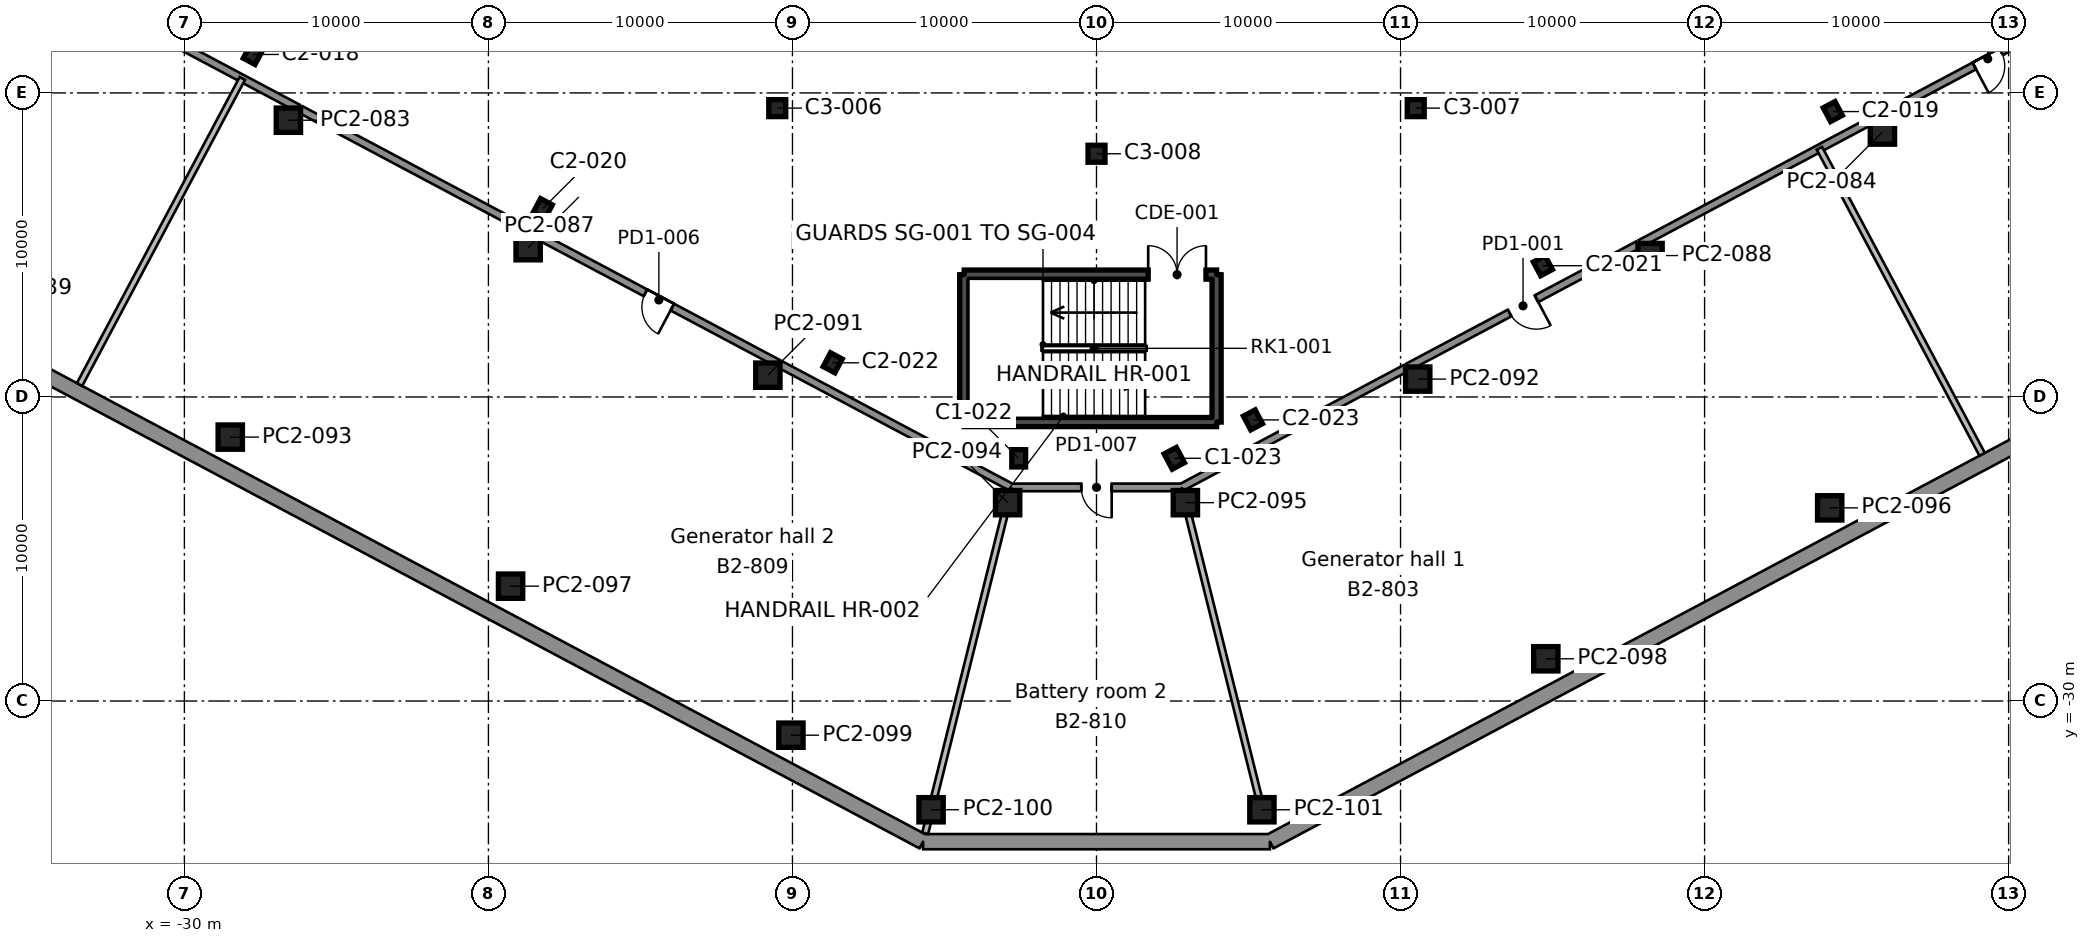
"""IFC4 building model, lengths in metres.
Left out: names, types, materials, properties, quantities, classifications, styles, units other than length and angle.
Written with IfcOpenShell. Run it as: python <this file> out.ifc"""

import sys

from ifc_helpers import new_model, si_unit, direction, frame, frame_2d, origin, origin_2d, place, context, subcontext, project, spatial, rectangle, hollow_rectangle, i_section, extrude, element, fill, save


model = new_model("IFC4")
c1 = context("Model", 3, precision=1e-05, world=origin(), true_north=direction((0.0, 1.0)))
c2 = subcontext(c1, "Body", "Model", "MODEL_VIEW")
j1 = project(units=[si_unit("LENGTHUNIT", "METRE"), si_unit("PLANEANGLEUNIT", "RADIAN")], contexts=[c1])
p1 = place(None, origin())
s1 = spatial("IfcSite", under=j1, at=p1, CompositionType="ELEMENT")
p2 = place(p1, origin())
s2 = spatial("IfcBuilding", under=s1, at=p2, CompositionType="ELEMENT")
p3 = place(p2, frame((0.0, 0.0, -9.0)))
s3 = spatial("IfcBuildingStorey", under=s2, at=p3, CompositionType="ELEMENT", Elevation=-9.0)
for number, where, z_axis, x_axis in (
    (1, (-2.559, -22.017, 0.0), (0.0, 0.0, 1.0), (1.0, 0.0, 0.0)),
    (2, (2.559, -22.017, 0.0), (0.0, 0.0, 1.0), (0.883, 0.469, 0.0)),
):
    element("IfcColumn", number, at=place(p3, frame(where, z_axis=z_axis, x_axis=x_axis)), inside=s3, PredefinedType="COLUMN", context=c2, shape_type="SweptSolid", body=[
        extrude(i_section(OverallWidth=0.455, OverallDepth=0.569, WebThickness=0.078, FlangeThickness=0.125, FilletRadius=0.015, at=origin_2d()), origin(), (0.0, 0.0, 1.0), 4.5),
    ])
for number, where, z_axis, x_axis in (
    (3, (5.146, -20.754, 0.0), (0.0, 0.0, 1.0), (0.883, 0.469, 0.0)),
    (4, (-8.677, -18.876, 0.0), (0.0, 0.0, 1.0), (0.883, -0.469, 0.0)),
    (5, (14.681, -15.683, 0.0), (0.0, 0.0, 1.0), (0.883, 0.469, 0.0)),
    (6, (-18.213, -13.805, 0.0), (0.0, 0.0, 1.0), (0.883, -0.469, 0.0)),
):
    element("IfcColumn", number, at=place(p3, frame(where, z_axis=z_axis, x_axis=x_axis)), inside=s3, PredefinedType="COLUMN", context=c2, shape_type="SweptSolid", body=[
        extrude(i_section(OverallWidth=0.437, OverallDepth=0.513, WebThickness=0.061, FlangeThickness=0.097, FilletRadius=0.015, at=origin_2d()), origin(), (0.0, 0.0, 1.0), 4.5),
    ])
p4 = place(p3, frame((0.0, -12.0, 0.0), z_axis=(0.0, 0.0, 1.0), x_axis=(1.0, 0.0, 0.0)))
e7 = element("IfcColumn", 7, at=p4, inside=s3, PredefinedType="COLUMN", context=c2, shape_type="SweptSolid", body=[
    extrude(hollow_rectangle(XDim=0.559, YDim=0.559, WallThickness=0.024, InnerFilletRadius=0.012, OuterFilletRadius=0.035, at=origin_2d()), origin(), (0.0, 0.0, 1.0), 4.5),
])
p5 = place(p3, frame((24.217, -10.613, 0.0), z_axis=(0.0, 0.0, 1.0), x_axis=(0.882947592859, 0.469471562786, 0.0)))
e8 = element("IfcColumn", 8, at=p5, inside=s3, PredefinedType="COLUMN", context=c2, shape_type="SweptSolid", body=[
    extrude(i_section(OverallWidth=0.437, OverallDepth=0.513, WebThickness=0.061, FlangeThickness=0.097, FilletRadius=0.015, at=origin_2d()), origin(), (0.0, 0.0, 1.0), 4.5),
])
for number, where, z_axis, x_axis in (
    (9, (-10.5, -10.5, 0.0), (0.0, 0.0, 1.0), (1.0, 0.0, 0.0)),
    (10, (10.5, -10.5, 0.0), (0.0, 0.0, 1.0), (1.0, 0.0, 0.0)),
):
    element("IfcColumn", number, at=place(p3, frame(where, z_axis=z_axis, x_axis=x_axis)), inside=s3, PredefinedType="COLUMN", context=c2, shape_type="SweptSolid", body=[
        extrude(hollow_rectangle(XDim=0.559, YDim=0.559, WallThickness=0.024, InnerFilletRadius=0.012, OuterFilletRadius=0.035, at=origin_2d()), origin(), (0.0, 0.0, 1.0), 4.5),
    ])
p6 = place(p3, frame((-27.749, -8.735, 0.0), z_axis=(0.0, 0.0, 1.0), x_axis=(0.882947592859, -0.469471562786, 0.0)))
e11 = element("IfcColumn", 11, at=p6, inside=s3, PredefinedType="COLUMN", context=c2, shape_type="SweptSolid", body=[
    extrude(i_section(OverallWidth=0.437, OverallDepth=0.513, WebThickness=0.061, FlangeThickness=0.097, FilletRadius=0.015, at=origin_2d()), origin(), (0.0, 0.0, 1.0), 4.5),
])
p7 = place(p3, frame((3.95, -15.975, 0.0), z_axis=(0.0, 0.0, 1.0), x_axis=(0.0, -1.0, 0.0)))
e12 = element("IfcWall", 12, at=p7, inside=s3, PredefinedType="SHEAR", context=c2, shape_type="SweptSolid", body=[
    extrude(rectangle(XDim=4.85, YDim=0.3, at=frame_2d((2.425, 0.0))), origin(), (0.0, 0.0, 1.0), 4.5),
])
p8 = place(p3, frame((3.95, -20.825, 0.0), z_axis=(0.0, 0.0, 1.0), x_axis=(-1.0, 0.0, 0.0)))
e13 = element("IfcWall", 13, at=p8, inside=s3, PredefinedType="SHEAR", context=c2, shape_type="SweptSolid", body=[
    extrude(rectangle(XDim=8.3, YDim=0.3, at=frame_2d((4.15, 0.0))), origin(), (0.0, 0.0, 1.0), 4.5),
])
p9 = place(p3, frame((-4.35, -20.825, 0.0), z_axis=(0.0, 0.0, 1.0), x_axis=(0.0, 1.0, 0.0)))
e14 = element("IfcWall", 14, at=p9, inside=s3, PredefinedType="SHEAR", context=c2, shape_type="SweptSolid", body=[
    extrude(rectangle(XDim=4.85, YDim=0.3, at=frame_2d((2.425, 0.0))), origin(), (0.0, 0.0, 1.0), 4.5),
])
p10 = place(p3, frame((-4.35, -15.975, 0.0), z_axis=(0.0, 0.0, 1.0), x_axis=(1.0, 0.0, 0.0)))
e15 = element("IfcWall", 15, at=p10, inside=s3, PredefinedType="SHEAR", context=c2, shape_type="SweptSolid", body=[
    extrude(rectangle(XDim=8.3, YDim=0.3, at=frame_2d((4.15, 0.0))), origin(), (0.0, 0.0, 1.0), 4.5),
])
p11 = place(p10, frame((6.05, 0.0, 0.0)))
e16 = element("IfcOpeningElement", 16, at=p11, cuts=e15, PredefinedType="OPENING", context=c2, shape_type="SweptSolid", body=[
    extrude(rectangle(XDim=1.9, YDim=2.1, at=frame_2d((0.95, 1.05))), frame((0.0, 0.16, 0.0), z_axis=(0.0, -1.0, 0.0), x_axis=(1.0, 0.0, 0.0)), (0.0, 0.0, 1.0), 0.32),
])
p12 = place(p3, frame((5.703, -34.625, 0.0), z_axis=(0.0, 0.0, 1.0), x_axis=(0.882947521781, 0.469471696464, 0.0)))
e17 = element("IfcWall", 17, at=p12, inside=s3, PredefinedType="SOLIDWALL", context=c2, shape_type="SweptSolid", body=[
    extrude(rectangle(XDim=85.294, YDim=0.5, at=frame_2d((42.647, 0.0))), origin(), (0.0, 0.0, 1.0), 4.5),
])
p13 = place(p3, frame((-56.767, -7.475, 0.0), z_axis=(0.0, 0.0, 1.0), x_axis=(0.882947974138, -0.469470845703, 0.0)))
e18 = element("IfcWall", 18, at=p13, inside=s3, PredefinedType="SOLIDWALL", context=c2, shape_type="SweptSolid", body=[
    extrude(rectangle(XDim=57.833, YDim=0.5, at=frame_2d((28.917, 0.0))), origin(), (0.0, 0.0, 1.0), 4.5),
])
p14 = place(p3, frame((-5.703, -34.625, 0.0), z_axis=(0.0, 0.0, 1.0), x_axis=(1.0, 0.0, 0.0)))
e19 = element("IfcWall", 19, at=p14, inside=s3, PredefinedType="SOLIDWALL", context=c2, shape_type="SweptSolid", body=[
    extrude(rectangle(XDim=11.406, YDim=0.5, at=frame_2d((5.703, 0.0))), origin(), (0.0, 0.0, 1.0), 4.5),
])
for number, where, z_axis, x_axis in (
    (20, (-5.441, -33.576, 0.0), (0.0, 0.0, 1.0), (1.0, 0.0, 0.0)),
    (21, (5.441, -33.576, 0.0), (0.0, 0.0, 1.0), (1.0, 0.0, 0.0)),
    (22, (-10.051, -31.124, 0.0), (0.0, 0.0, 1.0), (1.0, 0.0, 0.0)),
    (23, (14.778, -28.611, 0.0), (0.0, 0.0, 1.0), (1.0, 0.0, 0.0)),
    (24, (-19.271, -26.222, 0.0), (0.0, 0.0, 1.0), (1.0, 0.0, 0.0)),
    (25, (24.115, -23.647, 0.0), (0.0, 0.0, 1.0), (1.0, 0.0, 0.0)),
    (26, (-2.923, -23.476, 0.0), (0.0, 0.0, 1.0), (1.0, 0.0, 0.0)),
    (27, (2.923, -23.476, 0.0), (0.0, 0.0, 1.0), (1.0, 0.0, 0.0)),
    (28, (-28.491, -21.32, 0.0), (0.0, 0.0, 1.0), (1.0, 0.0, 0.0)),
    (29, (10.565, -19.412, 0.0), (0.0, 0.0, 1.0), (1.0, 0.0, 0.0)),
    (30, (-10.809, -19.283, 0.0), (0.0, 0.0, 1.0), (1.0, 0.0, 0.0)),
    (31, (18.207, -15.349, 0.0), (0.0, 0.0, 1.0), (1.0, 0.0, 0.0)),
    (32, (-18.694, -15.09, 0.0), (0.0, 0.0, 1.0), (1.0, 0.0, 0.0)),
    (33, (25.849, -11.286, 0.0), (0.0, 0.0, 1.0), (1.0, 0.0, 0.0)),
    (34, (-26.579, -10.897, 0.0), (0.0, 0.0, 1.0), (1.0, 0.0, 0.0)),
):
    element("IfcColumn", number, at=place(p3, frame(where, z_axis=z_axis, x_axis=x_axis)), inside=s3, PredefinedType="COLUMN", context=c2, shape_type="SweptSolid", body=[
        extrude(rectangle(XDim=0.8, YDim=0.8, at=origin_2d()), origin(), (0.0, 0.0, 1.0), 4.1),
    ])
p15 = place(p3, frame((29.129, -21.886, 0.0), z_axis=(0.0, 0.0, 1.0), x_axis=(-0.469474097874, 0.882946244924, 0.0)))
e35 = element("IfcWall", 35, at=p15, inside=s3, PredefinedType="PARTITIONING", context=c2, shape_type="SweptSolid", body=[
    extrude(rectangle(XDim=11.4, YDim=0.2, at=frame_2d((5.7, 0.0))), origin(), (0.0, 0.0, 1.0), 4.1),
])
p16 = place(p3, frame((3.023, -23.876, 0.0), z_axis=(0.0, 0.0, 1.0), x_axis=(0.241930250256, -0.970293643188, 0.0)))
e36 = element("IfcWall", 36, at=p16, inside=s3, PredefinedType="PARTITIONING", context=c2, shape_type="SweptSolid", body=[
    extrude(rectangle(XDim=9.585, YDim=0.2, at=frame_2d((4.792, 0.0))), origin(), (0.0, 0.0, 1.0), 4.1),
])
p17 = place(p3, frame((23.781, -11.819, 0.0), z_axis=(0.0, 0.0, 1.0), x_axis=(-0.882996705644, -0.469379183413, 0.0)))
e37 = element("IfcWall", 37, at=p17, inside=s3, PredefinedType="SOLIDWALL", context=c2, shape_type="SweptSolid", body=[
    extrude(rectangle(XDim=6.668, YDim=0.25, at=frame_2d((3.334, 0.0))), origin(), (0.0, 0.0, 1.0), 4.1),
])
p18 = place(p3, frame((17.807, -14.995, 0.0), z_axis=(0.0, 0.0, 1.0), x_axis=(-0.882988627018, -0.46939438062, 0.0)))
e38 = element("IfcWall", 38, at=p18, inside=s3, PredefinedType="SOLIDWALL", context=c2, shape_type="SweptSolid", body=[
    extrude(rectangle(XDim=8.558, YDim=0.25, at=frame_2d((4.279, 0.0))), origin(), (0.0, 0.0, 1.0), 4.1),
])
p19 = place(p18, frame((3.779, 0.0, 0.0)))
e39 = element("IfcOpeningElement", 39, at=p19, cuts=e38, PredefinedType="OPENING", context=c2, shape_type="SweptSolid", body=[
    extrude(rectangle(XDim=1.0, YDim=2.1, at=frame_2d((0.5, 1.05))), frame((0.0, 0.135, 0.0), z_axis=(0.0, -1.0, 0.0), x_axis=(1.0, 0.0, 0.0)), (0.0, 0.0, 1.0), 0.27),
])
p20 = place(p3, frame((10.165, -19.057, 0.0), z_axis=(0.0, 0.0, 1.0), x_axis=(-0.882987691761, -0.469396139949, 0.0)))
e40 = element("IfcWall", 40, at=p20, inside=s3, PredefinedType="SOLIDWALL", context=c2, shape_type="SweptSolid", body=[
    extrude(rectangle(XDim=8.347, YDim=0.25, at=frame_2d((4.174, 0.0))), origin(), (0.0, 0.0, 1.0), 4.1),
])
p21 = place(p3, frame((33.091, -6.869, 0.0), z_axis=(0.0, 0.0, 1.0), x_axis=(-0.882945366868, -0.469475749243, 0.0)))
e41 = element("IfcWall", 41, at=p21, inside=s3, PredefinedType="SOLIDWALL", context=c2, shape_type="SweptSolid", body=[
    extrude(rectangle(XDim=8.557, YDim=0.25, at=frame_2d((4.279, 0.0))), origin(), (0.0, 0.0, 1.0), 4.1),
])
p22 = place(p21, frame((3.779, 0.0, 0.0)))
e42 = element("IfcOpeningElement", 42, at=p22, cuts=e41, PredefinedType="OPENING", context=c2, shape_type="SweptSolid", body=[
    extrude(rectangle(XDim=1.0, YDim=2.1, at=frame_2d((0.5, 1.05))), frame((0.0, 0.135, 0.0), z_axis=(0.0, -1.0, 0.0), x_axis=(1.0, 0.0, 0.0)), (0.0, 0.0, 1.0), 0.27),
])
p23 = place(p3, frame((25.449, -10.932, 0.0), z_axis=(0.0, 0.0, 1.0), x_axis=(-0.882889505907, -0.469580792153, 0.0)))
e43 = element("IfcWall", 43, at=p23, inside=s3, PredefinedType="SOLIDWALL", context=c2, shape_type="SweptSolid", body=[
    extrude(rectangle(XDim=1.887, YDim=0.25, at=frame_2d((0.944, 0.0))), origin(), (0.0, 0.0, 1.0), 4.1),
])
p24 = place(p3, frame((-33.448, -19.59, 0.0), z_axis=(0.0, 0.0, 1.0), x_axis=(0.469466279335, 0.882950402099, 0.0)))
e44 = element("IfcWall", 44, at=p24, inside=s3, PredefinedType="PARTITIONING", context=c2, shape_type="SweptSolid", body=[
    extrude(rectangle(XDim=11.4, YDim=0.2, at=frame_2d((5.7, 0.0))), origin(), (0.0, 0.0, 1.0), 4.1),
])
p25 = place(p3, frame((-28.092, -9.527, 0.0), z_axis=(0.0, 0.0, 1.0), x_axis=(-0.882951650701, 0.469463931016, 0.0)))
e45 = element("IfcWall", 45, at=p25, inside=s3, PredefinedType="SOLIDWALL", context=c2, shape_type="SweptSolid", body=[
    extrude(rectangle(XDim=6.765, YDim=0.25, at=frame_2d((3.382, 0.0))), origin(), (0.0, 0.0, 1.0), 4.1),
])
p26 = place(p3, frame((-5.635, -34.351, 0.0), z_axis=(0.0, 0.0, 1.0), x_axis=(0.241792832925, 0.970327896098, 0.0)))
e46 = element("IfcWall", 46, at=p26, inside=s3, PredefinedType="PARTITIONING", context=c2, shape_type="SweptSolid", body=[
    extrude(rectangle(XDim=0.387, YDim=0.2, at=frame_2d((0.193, 0.0))), origin(), (0.0, 0.0, 1.0), 4.1),
])
p27 = place(p3, frame((-5.342, -33.176, 0.0), z_axis=(0.0, 0.0, 1.0), x_axis=(0.241930250256, 0.970293643188, 0.0)))
e47 = element("IfcWall", 47, at=p27, inside=s3, PredefinedType="PARTITIONING", context=c2, shape_type="SweptSolid", body=[
    extrude(rectangle(XDim=9.585, YDim=0.2, at=frame_2d((4.792, 0.0))), origin(), (0.0, 0.0, 1.0), 4.1),
])
p28 = place(p3, frame((-2.794, -22.976, 0.0), z_axis=(0.0, 0.0, 1.0), x_axis=(-0.882976758677, 0.469416705749, 0.0)))
e48 = element("IfcWall", 48, at=p28, inside=s3, PredefinedType="SOLIDWALL", context=c2, shape_type="SweptSolid", body=[
    extrude(rectangle(XDim=8.624, YDim=0.25, at=frame_2d((4.312, 0.0))), origin(), (0.0, 0.0, 1.0), 4.1),
])
p29 = place(p3, frame((-10.493, -18.883, 0.0), z_axis=(0.0, 0.0, 1.0), x_axis=(-0.882973285467, 0.469423238828, 0.0)))
e49 = element("IfcWall", 49, at=p29, inside=s3, PredefinedType="SOLIDWALL", context=c2, shape_type="SweptSolid", body=[
    extrude(rectangle(XDim=8.835, YDim=0.25, at=frame_2d((4.417, 0.0))), origin(), (0.0, 0.0, 1.0), 4.1),
])
p30 = place(p29, frame((3.918, 0.0, 0.0)))
e50 = element("IfcOpeningElement", 50, at=p30, cuts=e49, PredefinedType="OPENING", context=c2, shape_type="SweptSolid", body=[
    extrude(rectangle(XDim=1.0, YDim=2.1, at=frame_2d((0.5, 1.05))), frame((0.0, 0.135, 0.0), z_axis=(0.0, -1.0, 0.0), x_axis=(1.0, 0.0, 0.0)), (0.0, 0.0, 1.0), 0.27),
])
p31 = place(p3, frame((-18.38, -14.69, 0.0), z_axis=(0.0, 0.0, 1.0), x_axis=(-0.882975751466, 0.469418600317, 0.0)))
e51 = element("IfcWall", 51, at=p31, inside=s3, PredefinedType="SOLIDWALL", context=c2, shape_type="SweptSolid", body=[
    extrude(rectangle(XDim=8.833, YDim=0.25, at=frame_2d((4.417, 0.0))), origin(), (0.0, 0.0, 1.0), 4.1),
])
p32 = place(p3, frame((-26.267, -10.497, 0.0), z_axis=(0.0, 0.0, 1.0), x_axis=(-0.882964142915, 0.469440435335, 0.0)))
e52 = element("IfcWall", 52, at=p32, inside=s3, PredefinedType="SOLIDWALL", context=c2, shape_type="SweptSolid", body=[
    extrude(rectangle(XDim=2.065, YDim=0.25, at=frame_2d((1.033, 0.0))), origin(), (0.0, 0.0, 1.0), 4.1),
])
p33 = place(p3, frame((2.802, -22.974, 0.0), z_axis=(0.0, 0.0, 1.0), x_axis=(-1.0, 0.0, 0.0)))
e53 = element("IfcWall", 53, at=p33, inside=s3, PredefinedType="SOLIDWALL", context=c2, shape_type="SweptSolid", body=[
    extrude(rectangle(XDim=5.604, YDim=0.25, at=frame_2d((2.802, 0.0))), origin(), (0.0, 0.0, 1.0), 4.1),
])
p34 = place(p33, frame((2.302, 0.0, 0.0)))
e54 = element("IfcOpeningElement", 54, at=p34, cuts=e53, PredefinedType="OPENING", context=c2, shape_type="SweptSolid", body=[
    extrude(rectangle(XDim=1.0, YDim=2.1, at=frame_2d((0.5, 1.05))), frame((0.0, 0.135, 0.0), z_axis=(0.0, -1.0, 0.0), x_axis=(1.0, 0.0, 0.0)), (0.0, 0.0, 1.0), 0.27),
])
p35 = place(p11, origin())
e55 = element("IfcDoor", 55, at=p35, inside=s3, OperationType="DOUBLE_DOOR_SINGLE_SWING", PredefinedType="DOOR", context=c2, shape_type="SweptSolid", body=[
    extrude(rectangle(XDim=1.9, YDim=2.1, at=frame_2d((0.95, 1.05))), frame((0.0, 0.025, 0.0), z_axis=(0.0, -1.0, 0.0), x_axis=(1.0, 0.0, 0.0)), (0.0, 0.0, 1.0), 0.05),
])
fill(e16, e55)
p36 = place(p30, origin())
e56 = element("IfcDoor", 56, at=p36, inside=s3, OperationType="SINGLE_SWING_LEFT", PredefinedType="DOOR", context=c2, shape_type="SweptSolid", body=[
    extrude(rectangle(XDim=1.0, YDim=2.1, at=frame_2d((0.5, 1.05))), frame((0.0, 0.025, 0.0), z_axis=(0.0, -1.0, 0.0), x_axis=(1.0, 0.0, 0.0)), (0.0, 0.0, 1.0), 0.05),
])
fill(e50, e56)
p37 = place(p19, origin())
e57 = element("IfcDoor", 57, at=p37, inside=s3, OperationType="SINGLE_SWING_LEFT", PredefinedType="DOOR", context=c2, shape_type="SweptSolid", body=[
    extrude(rectangle(XDim=1.0, YDim=2.1, at=frame_2d((0.5, 1.05))), frame((0.0, 0.025, 0.0), z_axis=(0.0, -1.0, 0.0), x_axis=(1.0, 0.0, 0.0)), (0.0, 0.0, 1.0), 0.05),
])
fill(e39, e57)
p38 = place(p22, origin())
e58 = element("IfcDoor", 58, at=p38, inside=s3, OperationType="SINGLE_SWING_RIGHT", PredefinedType="DOOR", context=c2, shape_type="SweptSolid", body=[
    extrude(rectangle(XDim=1.0, YDim=2.1, at=frame_2d((0.5, 1.05))), frame((0.0, 0.025, 0.0), z_axis=(0.0, -1.0, 0.0), x_axis=(1.0, 0.0, 0.0)), (0.0, 0.0, 1.0), 0.05),
])
fill(e42, e58)
p39 = place(p34, origin())
e59 = element("IfcDoor", 59, at=p39, inside=s3, OperationType="SINGLE_SWING_LEFT", PredefinedType="DOOR", context=c2, shape_type="SweptSolid", body=[
    extrude(rectangle(XDim=1.0, YDim=2.1, at=frame_2d((0.5, 1.05))), frame((0.0, 0.025, 0.0), z_axis=(0.0, -1.0, 0.0), x_axis=(1.0, 0.0, 0.0)), (0.0, 0.0, 1.0), 0.05),
])
fill(e54, e59)
save(model, sys.argv[1])
